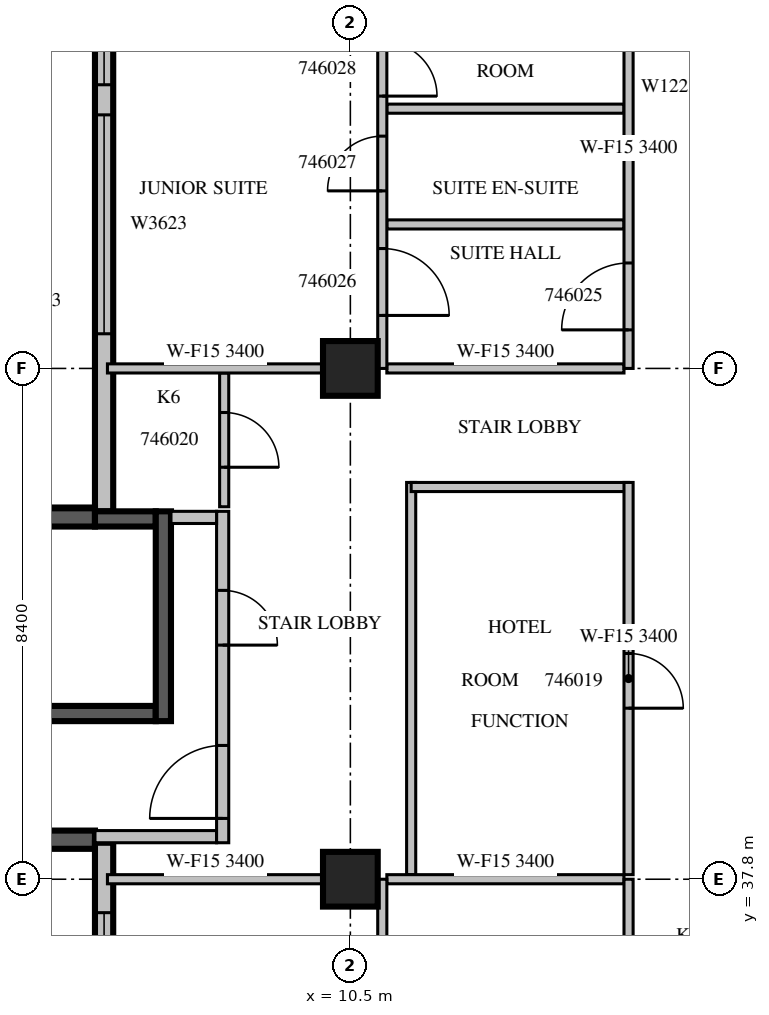
"""IFC4 building model, lengths in metres.
Left out: names, types, materials, properties, quantities, classifications, styles, units other than length and angle.
Written with IfcOpenShell. Run it as: python <this file> out.ifc"""

import sys

from ifc_helpers import new_model, si_unit, direction, frame, frame_2d, origin, origin_2d, place, context, subcontext, project, spatial, rectangle, extrude, source, transform, mapped, element, fill, save


model = new_model("IFC4")
c1 = context("Model", 3, precision=1e-05, world=origin(), true_north=direction((0.0, 1.0)))
c2 = subcontext(c1, "Body", "Model", "MODEL_VIEW")
j1 = project(units=[si_unit("LENGTHUNIT", "METRE"), si_unit("PLANEANGLEUNIT", "RADIAN")], contexts=[c1])
p1 = place(None, origin())
s1 = spatial("IfcSite", under=j1, at=p1, CompositionType="ELEMENT")
p2 = place(p1, origin())
s2 = spatial("IfcBuilding", under=s1, at=p2, CompositionType="ELEMENT")
p3 = place(p2, frame((0.0, 0.0, 208.2)))
s3 = spatial("IfcBuildingStorey", under=s2, at=p3, CompositionType="ELEMENT", Elevation=208.2)
m1 = source(origin(), c2, "Body", "SweptSolid", [
    extrude(rectangle(XDim=0.9, YDim=0.9, at=origin_2d()), origin(), (0.0, 0.0, 1.0), 3.8),
])
for number, where, z_axis, x_axis in (
    (1, (10.5, 37.8, 0.0), (0.0, 0.0, 1.0), (1.0, 0.0, 0.0)),
    (2, (10.5, 46.2, 0.0), (0.0, 0.0, 1.0), (1.0, 0.0, 0.0)),
):
    element("IfcColumn", number, at=place(p3, frame(where, z_axis=z_axis, x_axis=x_axis)), inside=s3, PredefinedType="COLUMN", context=c2, shape_type="MappedRepresentation", body=[
        mapped(m1, transform((0.0, 0.0, 0.0), scale=1.0)),
    ])
m2 = source(origin(), c2, "Body", "SweptSolid", [
    extrude(rectangle(XDim=9.91, YDim=0.3, at=frame_2d((4.955, 0.0))), origin(), (0.0, 0.0, 1.0), 3.4),
])
p4 = place(p3, frame((6.45, 53.76, 0.0), z_axis=(0.0, 0.0, 1.0), x_axis=(0.0, -1.0, 0.0)))
e3 = element("IfcWall", 3, at=p4, inside=s3, PredefinedType="STANDARD", context=c2, shape_type="MappedRepresentation", body=[
    mapped(m2, transform((0.0, 0.0, 0.0), scale=1.0)),
])
m3 = source(origin(), c2, "Body", "SweptSolid", [
    extrude(rectangle(XDim=3.6, YDim=2.3, at=frame_2d((1.8, 1.15))), frame((0.0, 0.16, 0.0), z_axis=(0.0, -1.0, 0.0), x_axis=(1.0, 0.0, 0.0)), (0.0, 0.0, 1.0), 0.32),
])
p5 = place(p4, frame((3.39, 0.0, 0.6)))
e4 = element("IfcOpeningElement", 4, at=p5, cuts=e3, PredefinedType="OPENING", context=c2, shape_type="MappedRepresentation", body=[
    mapped(m3, transform((0.0, 0.0, 0.0), scale=1.0)),
])
m4 = source(origin(), c2, "Body", "SweptSolid", [
    extrude(rectangle(XDim=2.4, YDim=2.3, at=frame_2d((1.2, 1.15))), frame((0.0, 0.16, 0.0), z_axis=(0.0, -1.0, 0.0), x_axis=(1.0, 0.0, 0.0)), (0.0, 0.0, 1.0), 0.32),
])
p6 = place(p4, frame((0.495, 0.0, 0.6)))
e5 = element("IfcOpeningElement", 5, at=p6, cuts=e3, PredefinedType="OPENING", context=c2, shape_type="MappedRepresentation", body=[
    mapped(m4, transform((0.0, 0.0, 0.0), scale=1.0)),
])
m5 = source(origin(), c2, "Body", "SweptSolid", [
    extrude(rectangle(XDim=6.1, YDim=0.3, at=frame_2d((3.05, 0.0))), origin(), (0.0, 0.0, 1.0), 3.4),
])
for number, where, z_axis, x_axis in (
    (6, (6.3, 43.75, 0.0), (0.0, 0.0, 1.0), (-1.0, 0.0, 0.0)),
    (7, (0.2, 38.45, 0.0), (0.0, 0.0, 1.0), (1.0, 0.0, 0.0)),
):
    element("IfcWall", number, at=place(p3, frame(where, z_axis=z_axis, x_axis=x_axis)), inside=s3, PredefinedType="SOLIDWALL", context=c2, shape_type="MappedRepresentation", body=[
        mapped(m5, transform((0.0, 0.0, 0.0), scale=1.0)),
    ])
m6 = source(origin(), c2, "Body", "SweptSolid", [
    extrude(rectangle(XDim=16.6, YDim=0.3, at=frame_2d((8.3, 0.0))), origin(), (0.0, 0.0, 1.0), 3.4),
])
p7 = place(p3, frame((6.45, 38.4, 0.0), z_axis=(0.0, 0.0, 1.0), x_axis=(0.0, -1.0, 0.0)))
e8 = element("IfcWall", 8, at=p7, inside=s3, PredefinedType="STANDARD", context=c2, shape_type="MappedRepresentation", body=[
    mapped(m6, transform((0.0, 0.0, 0.0), scale=1.0)),
])
m7 = source(origin(), c2, "Body", "SweptSolid", [
    extrude(rectangle(XDim=1.8, YDim=2.3, at=frame_2d((0.9, 1.15))), frame((0.0, 0.16, 0.0), z_axis=(0.0, -1.0, 0.0), x_axis=(1.0, 0.0, 0.0)), (0.0, 0.0, 1.0), 0.32),
])
p8 = place(p7, frame((1.15, 0.0, 0.6)))
e9 = element("IfcOpeningElement", 9, at=p8, cuts=e8, PredefinedType="OPENING", context=c2, shape_type="MappedRepresentation", body=[
    mapped(m7, transform((0.0, 0.0, 0.0), scale=1.0)),
])
p9 = place(p7, frame((9.438, 0.0, 0.6)))
e10 = element("IfcOpeningElement", 10, at=p9, cuts=e8, PredefinedType="OPENING", context=c2, shape_type="MappedRepresentation", body=[
    mapped(m7, transform((0.0, 0.0, 0.0), scale=1.0)),
])
m8 = source(origin(), c2, "Body", "SweptSolid", [
    extrude(rectangle(XDim=1.2, YDim=2.3, at=frame_2d((0.6, 1.15))), frame((0.0, 0.16, 0.0), z_axis=(0.0, -1.0, 0.0), x_axis=(1.0, 0.0, 0.0)), (0.0, 0.0, 1.0), 0.32),
])
p10 = place(p7, frame((14.338, 0.0, 0.6)))
e11 = element("IfcOpeningElement", 11, at=p10, cuts=e8, PredefinedType="OPENING", context=c2, shape_type="MappedRepresentation", body=[
    mapped(m8, transform((0.0, 0.0, 0.0), scale=1.0)),
])
p11 = place(p7, frame((11.887, 0.0, 0.6)))
e12 = element("IfcOpeningElement", 12, at=p11, cuts=e8, PredefinedType="OPENING", context=c2, shape_type="MappedRepresentation", body=[
    mapped(m7, transform((0.0, 0.0, 0.0), scale=1.0)),
])
m9 = source(origin(), c2, "Body", "SweptSolid", [
    extrude(rectangle(XDim=1.0, YDim=2.1, at=frame_2d((0.5, 1.05))), frame((0.0, 0.16, 0.0), z_axis=(0.0, -1.0, 0.0), x_axis=(1.0, 0.0, 0.0)), (0.0, 0.0, 1.0), 0.32),
])
p12 = place(p7, frame((5.45, 0.0, 0.0)))
e13 = element("IfcOpeningElement", 13, at=p12, cuts=e8, PredefinedType="OPENING", context=c2, shape_type="MappedRepresentation", body=[
    mapped(m9, transform((0.0, 0.0, 0.0), scale=1.0)),
])
m10 = source(origin(), c2, "Body", "SweptSolid", [
    extrude(rectangle(XDim=7.0, YDim=0.25, at=frame_2d((3.5, 0.0))), origin(), (0.0, 0.0, 1.0), 3.4),
])
p13 = place(p3, frame((0.3, 40.525, 0.0), z_axis=(0.0, 0.0, 1.0), x_axis=(1.0, 0.0, 0.0)))
e14 = element("IfcWall", 14, at=p13, inside=s3, PredefinedType="SOLIDWALL", context=c2, shape_type="MappedRepresentation", body=[
    mapped(m10, transform((0.0, 0.0, 0.0), scale=1.0)),
])
m11 = source(origin(), c2, "Body", "SweptSolid", [
    extrude(rectangle(XDim=1.1, YDim=2.1, at=frame_2d((0.55, 1.05))), frame((0.0, 0.135, 0.0), z_axis=(0.0, -1.0, 0.0), x_axis=(1.0, 0.0, 0.0)), (0.0, 0.0, 1.0), 0.27),
])
p14 = place(p13, frame((0.55, 0.0, 0.0)))
e15 = element("IfcOpeningElement", 15, at=p14, cuts=e14, PredefinedType="OPENING", context=c2, shape_type="MappedRepresentation", body=[
    mapped(m11, transform((0.0, 0.0, 0.0), scale=1.0)),
])
m12 = source(origin(), c2, "Body", "SweptSolid", [
    extrude(rectangle(XDim=1.0, YDim=0.25, at=frame_2d((0.5, 0.0))), origin(), (0.0, 0.0, 1.0), 3.4),
])
p15 = place(p3, frame((6.3, 43.725, 0.0), z_axis=(0.0, 0.0, 1.0), x_axis=(1.0, 0.0, 0.0)))
e16 = element("IfcWall", 16, at=p15, inside=s3, PredefinedType="SOLIDWALL", context=c2, shape_type="MappedRepresentation", body=[
    mapped(m12, transform((0.0, 0.0, 0.0), scale=1.0)),
])
m13 = source(origin(), c2, "Body", "SweptSolid", [
    extrude(rectangle(XDim=3.45, YDim=0.25, at=frame_2d((1.725, 0.0))), origin(), (0.0, 0.0, 1.0), 3.4),
])
p16 = place(p3, frame((7.425, 40.4, 0.0), z_axis=(0.0, 0.0, 1.0), x_axis=(0.0, 1.0, 0.0)))
e17 = element("IfcWall", 17, at=p16, inside=s3, PredefinedType="SOLIDWALL", context=c2, shape_type="MappedRepresentation", body=[
    mapped(m13, transform((0.0, 0.0, 0.0), scale=1.0)),
])
m14 = source(origin(), c2, "Body", "SweptSolid", [
    extrude(rectangle(XDim=2.0, YDim=0.2, at=frame_2d((1.0, 0.0))), origin(), (0.0, 0.0, 1.0), 3.4),
])
p17 = place(p3, frame((6.3, 38.5, 0.0), z_axis=(0.0, 0.0, 1.0), x_axis=(1.0, 0.0, 0.0)))
e18 = element("IfcWall", 18, at=p17, inside=s3, PredefinedType="PARTITIONING", context=c2, shape_type="MappedRepresentation", body=[
    mapped(m14, transform((0.0, 0.0, 0.0), scale=1.0)),
])
m15 = source(origin(), c2, "Body", "SweptSolid", [
    extrude(rectangle(XDim=5.45, YDim=0.2, at=frame_2d((2.725, 0.0))), origin(), (0.0, 0.0, 1.0), 3.4),
])
p18 = place(p3, frame((8.4, 38.4, 0.0), z_axis=(0.0, 0.0, 1.0), x_axis=(0.0, 1.0, 0.0)))
e19 = element("IfcWall", 19, at=p18, inside=s3, PredefinedType="PARTITIONING", context=c2, shape_type="MappedRepresentation", body=[
    mapped(m15, transform((0.0, 0.0, 0.0), scale=1.0)),
])
m16 = source(origin(), c2, "Body", "SweptSolid", [
    extrude(rectangle(XDim=1.2, YDim=2.1, at=frame_2d((0.6, 1.05))), frame((0.0, 0.11, 0.0), z_axis=(0.0, -1.0, 0.0), x_axis=(1.0, 0.0, 0.0)), (0.0, 0.0, 1.0), 0.22),
])
p19 = place(p18, frame((0.4, 0.0, 0.0)))
e20 = element("IfcOpeningElement", 20, at=p19, cuts=e19, PredefinedType="OPENING", context=c2, shape_type="MappedRepresentation", body=[
    mapped(m16, transform((0.0, 0.0, 0.0), scale=1.0)),
])
m17 = source(origin(), c2, "Body", "SweptSolid", [
    extrude(rectangle(XDim=0.9, YDim=2.1, at=frame_2d((0.45, 1.05))), frame((0.0, 0.11, 0.0), z_axis=(0.0, -1.0, 0.0), x_axis=(1.0, 0.0, 0.0)), (0.0, 0.0, 1.0), 0.22),
])
p20 = place(p18, frame((3.25, 0.0, 0.0)))
e21 = element("IfcOpeningElement", 21, at=p20, cuts=e19, PredefinedType="OPENING", context=c2, shape_type="MappedRepresentation", body=[
    mapped(m17, transform((0.0, 0.0, 0.0), scale=1.0)),
])
m18 = source(origin(), c2, "Body", "SweptSolid", [
    extrude(rectangle(XDim=0.75, YDim=0.2, at=frame_2d((0.375, 0.0))), origin(), (0.0, 0.0, 1.0), 3.4),
])
p21 = place(p3, frame((7.55, 43.75, 0.0), z_axis=(0.0, 0.0, 1.0), x_axis=(1.0, 0.0, 0.0)))
e22 = element("IfcWall", 22, at=p21, inside=s3, PredefinedType="PARTITIONING", context=c2, shape_type="MappedRepresentation", body=[
    mapped(m18, transform((0.0, 0.0, 0.0), scale=1.0)),
])
m19 = source(origin(), c2, "Body", "SweptSolid", [
    extrude(rectangle(XDim=6.45, YDim=0.15, at=frame_2d((3.225, 0.0))), origin(), (0.0, 0.0, 1.0), 3.4),
])
p22 = place(p3, frame((11.5, 44.325, 0.0), z_axis=(0.0, 0.0, 1.0), x_axis=(0.0, -1.0, 0.0)))
e23 = element("IfcWall", 23, at=p22, inside=s3, PredefinedType="PARTITIONING", context=c2, shape_type="MappedRepresentation", body=[
    mapped(m19, transform((0.0, 0.0, 0.0), scale=1.0)),
])
m20 = source(origin(), c2, "Body", "SweptSolid", [
    extrude(rectangle(XDim=3.575, YDim=0.15, at=frame_2d((1.788, 0.0))), origin(), (0.0, 0.0, 1.0), 3.4),
])
p23 = place(p3, frame((15.075, 44.25, 0.0), z_axis=(0.0, 0.0, 1.0), x_axis=(-1.0, 0.0, 0.0)))
e24 = element("IfcWall", 24, at=p23, inside=s3, PredefinedType="PARTITIONING", context=c2, shape_type="MappedRepresentation", body=[
    mapped(m20, transform((0.0, 0.0, 0.0), scale=1.0)),
])
p24 = place(p3, frame((15.075, 37.875, 0.0), z_axis=(0.0, 0.0, 1.0), x_axis=(0.0, 1.0, 0.0)))
e25 = element("IfcWall", 25, at=p24, inside=s3, PredefinedType="PARTITIONING", context=c2, shape_type="MappedRepresentation", body=[
    mapped(m19, transform((0.0, 0.0, 0.0), scale=1.0)),
])
m21 = source(origin(), c2, "Body", "SweptSolid", [
    extrude(rectangle(XDim=0.9, YDim=2.1, at=frame_2d((0.45, 1.05))), frame((0.0, 0.085, 0.0), z_axis=(0.0, -1.0, 0.0), x_axis=(1.0, 0.0, 0.0)), (0.0, 0.0, 1.0), 0.17),
])
p25 = place(p24, frame((2.737, 0.0, 0.0)))
e26 = element("IfcOpeningElement", 26, at=p25, cuts=e25, PredefinedType="OPENING", context=c2, shape_type="MappedRepresentation", body=[
    mapped(m21, transform((0.0, 0.0, 0.0), scale=1.0)),
])
m22 = source(origin(), c2, "Body", "SweptSolid", [
    extrude(rectangle(XDim=2.2, YDim=0.15, at=frame_2d((1.1, 0.0))), origin(), (0.0, 0.0, 1.0), 3.4),
])
p26 = place(p3, frame((8.425, 43.925, 0.0), z_axis=(0.0, 0.0, 1.0), x_axis=(0.0, 1.0, 0.0)))
e27 = element("IfcWall", 27, at=p26, inside=s3, PredefinedType="PARTITIONING", context=c2, shape_type="MappedRepresentation", body=[
    mapped(m22, transform((0.0, 0.0, 0.0), scale=1.0)),
])
p27 = place(p26, frame((0.65, 0.0, 0.0)))
e28 = element("IfcOpeningElement", 28, at=p27, cuts=e27, PredefinedType="OPENING", context=c2, shape_type="MappedRepresentation", body=[
    mapped(m21, transform((0.0, 0.0, 0.0), scale=1.0)),
])
m23 = source(origin(), c2, "Body", "SweptSolid", [
    extrude(rectangle(XDim=3.546, YDim=0.15, at=frame_2d((1.773, 0.0))), origin(), (0.0, 0.0, 1.0), 3.4),
])
p28 = place(p3, frame((10.051, 37.8, 0.0), z_axis=(0.0, 0.0, 1.0), x_axis=(-1.0, 0.0, 0.0)))
e29 = element("IfcWall", 29, at=p28, inside=s3, PredefinedType="PARTITIONING", context=c2, shape_type="MappedRepresentation", body=[
    mapped(m23, transform((0.0, 0.0, 0.0), scale=1.0)),
])
m24 = source(origin(), c2, "Body", "SweptSolid", [
    extrude(rectangle(XDim=3.9, YDim=0.15, at=frame_2d((1.95, 0.0))), origin(), (0.0, 0.0, 1.0), 3.4),
])
p29 = place(p3, frame((15.0, 37.8, 0.0), z_axis=(0.0, 0.0, 1.0), x_axis=(-1.0, 0.0, 0.0)))
e30 = element("IfcWall", 30, at=p29, inside=s3, PredefinedType="PARTITIONING", context=c2, shape_type="MappedRepresentation", body=[
    mapped(m24, transform((0.0, 0.0, 0.0), scale=1.0)),
])
m25 = source(origin(), c2, "Body", "SweptSolid", [
    extrude(rectangle(XDim=8.4, YDim=0.15, at=frame_2d((4.2, 0.0))), origin(), (0.0, 0.0, 1.0), 3.4),
])
p30 = place(p3, frame((11.025, 29.4, 0.0), z_axis=(0.0, 0.0, 1.0), x_axis=(0.0, 1.0, 0.0)))
e31 = element("IfcWall", 31, at=p30, inside=s3, PredefinedType="PARTITIONING", context=c2, shape_type="MappedRepresentation", body=[
    mapped(m25, transform((0.0, 0.0, 0.0), scale=1.0)),
])
m26 = source(origin(), c2, "Body", "SweptSolid", [
    extrude(rectangle(XDim=1.1, YDim=2.1, at=frame_2d((0.55, 1.05))), frame((0.0, 0.085, 0.0), z_axis=(0.0, -1.0, 0.0), x_axis=(1.0, 0.0, 0.0)), (0.0, 0.0, 1.0), 0.17),
])
p31 = place(p30, frame((0.876, 0.0, 0.0)))
e32 = element("IfcOpeningElement", 32, at=p31, cuts=e31, PredefinedType="OPENING", context=c2, shape_type="MappedRepresentation", body=[
    mapped(m26, transform((0.0, 0.0, 0.0), scale=1.0)),
])
p32 = place(p30, frame((3.38, 0.0, 0.0)))
e33 = element("IfcOpeningElement", 33, at=p32, cuts=e31, PredefinedType="OPENING", context=c2, shape_type="MappedRepresentation", body=[
    mapped(m21, transform((0.0, 0.0, 0.0), scale=1.0)),
])
p33 = place(p30, frame((6.154, 0.0, 0.0)))
e34 = element("IfcOpeningElement", 34, at=p33, cuts=e31, PredefinedType="OPENING", context=c2, shape_type="MappedRepresentation", body=[
    mapped(m21, transform((0.0, 0.0, 0.0), scale=1.0)),
])
for number, where, z_axis, x_axis in (
    (35, (15.0, 48.568, 0.0), (0.0, 0.0, 1.0), (-1.0, 0.0, 0.0)),
    (36, (15.0, 50.472, 0.0), (0.0, 0.0, 1.0), (-1.0, 0.0, 0.0)),
):
    element("IfcWall", number, at=place(p3, frame(where, z_axis=z_axis, x_axis=x_axis)), inside=s3, PredefinedType="PARTITIONING", context=c2, shape_type="MappedRepresentation", body=[
        mapped(m24, transform((0.0, 0.0, 0.0), scale=1.0)),
    ])
p34 = place(p3, frame((10.051, 46.2, 0.0), z_axis=(0.0, 0.0, 1.0), x_axis=(-1.0, 0.0, 0.0)))
e37 = element("IfcWall", 37, at=p34, inside=s3, PredefinedType="PARTITIONING", context=c2, shape_type="MappedRepresentation", body=[
    mapped(m23, transform((0.0, 0.0, 0.0), scale=1.0)),
])
p35 = place(p3, frame((15.0, 46.2, 0.0), z_axis=(0.0, 0.0, 1.0), x_axis=(-1.0, 0.0, 0.0)))
e38 = element("IfcWall", 38, at=p35, inside=s3, PredefinedType="PARTITIONING", context=c2, shape_type="MappedRepresentation", body=[
    mapped(m24, transform((0.0, 0.0, 0.0), scale=1.0)),
])
m27 = source(origin(), c2, "Body", "SweptSolid", [
    extrude(rectangle(XDim=7.26, YDim=0.15, at=frame_2d((3.63, 0.0))), origin(), (0.0, 0.0, 1.0), 3.4),
])
p36 = place(p3, frame((11.025, 46.2, 0.0), z_axis=(0.0, 0.0, 1.0), x_axis=(0.0, 1.0, 0.0)))
e39 = element("IfcWall", 39, at=p36, inside=s3, PredefinedType="PARTITIONING", context=c2, shape_type="MappedRepresentation", body=[
    mapped(m27, transform((0.0, 0.0, 0.0), scale=1.0)),
])
p37 = place(p36, frame((0.872, 0.0, 0.0)))
e40 = element("IfcOpeningElement", 40, at=p37, cuts=e39, PredefinedType="OPENING", context=c2, shape_type="MappedRepresentation", body=[
    mapped(m26, transform((0.0, 0.0, 0.0), scale=1.0)),
])
p38 = place(p36, frame((2.92, 0.0, 0.0)))
e41 = element("IfcOpeningElement", 41, at=p38, cuts=e39, PredefinedType="OPENING", context=c2, shape_type="MappedRepresentation", body=[
    mapped(m21, transform((0.0, 0.0, 0.0), scale=1.0)),
])
p39 = place(p36, frame((4.478, 0.0, 0.0)))
e42 = element("IfcOpeningElement", 42, at=p39, cuts=e39, PredefinedType="OPENING", context=c2, shape_type="MappedRepresentation", body=[
    mapped(m21, transform((0.0, 0.0, 0.0), scale=1.0)),
])
p40 = place(p3, frame((15.075, 29.4, 0.0), z_axis=(0.0, 0.0, 1.0), x_axis=(0.0, 1.0, 0.0)))
e43 = element("IfcWall", 43, at=p40, inside=s3, PredefinedType="PARTITIONING", context=c2, shape_type="MappedRepresentation", body=[
    mapped(m25, transform((0.0, 0.0, 0.0), scale=1.0)),
])
p41 = place(p40, frame((0.638, 0.0, 0.0)))
e44 = element("IfcOpeningElement", 44, at=p41, cuts=e43, PredefinedType="OPENING", context=c2, shape_type="MappedRepresentation", body=[
    mapped(m26, transform((0.0, 0.0, 0.0), scale=1.0)),
])
p42 = place(p3, frame((15.075, 46.2, 0.0), z_axis=(0.0, 0.0, 1.0), x_axis=(0.0, 1.0, 0.0)))
e45 = element("IfcWall", 45, at=p42, inside=s3, PredefinedType="PARTITIONING", context=c2, shape_type="MappedRepresentation", body=[
    mapped(m27, transform((0.0, 0.0, 0.0), scale=1.0)),
])
p43 = place(p42, frame((0.634, 0.0, 0.0)))
e46 = element("IfcOpeningElement", 46, at=p43, cuts=e45, PredefinedType="OPENING", context=c2, shape_type="MappedRepresentation", body=[
    mapped(m26, transform((0.0, 0.0, 0.0), scale=1.0)),
])
m28 = source(origin(), c2, "Body", "SweptSolid", [
    extrude(rectangle(XDim=3.6, YDim=2.3, at=frame_2d((1.8, 1.15))), frame((0.0, 0.03, 0.0), z_axis=(0.0, -1.0, 0.0), x_axis=(1.0, 0.0, 0.0)), (0.0, 0.0, 1.0), 0.06),
])
p44 = place(p5, origin())
e47 = element("IfcWindow", 47, at=p44, inside=s3, PartitioningType="SINGLE_PANEL", PredefinedType="WINDOW", context=c2, shape_type="MappedRepresentation", body=[
    mapped(m28, transform((0.0, 0.0, 0.0), scale=1.0)),
])
fill(e4, e47)
m29 = source(origin(), c2, "Body", "SweptSolid", [
    extrude(rectangle(XDim=2.4, YDim=2.3, at=frame_2d((1.2, 1.15))), frame((0.0, 0.03, 0.0), z_axis=(0.0, -1.0, 0.0), x_axis=(1.0, 0.0, 0.0)), (0.0, 0.0, 1.0), 0.06),
])
p45 = place(p6, origin())
e48 = element("IfcWindow", 48, at=p45, inside=s3, PartitioningType="SINGLE_PANEL", PredefinedType="WINDOW", context=c2, shape_type="MappedRepresentation", body=[
    mapped(m29, transform((0.0, 0.0, 0.0), scale=1.0)),
])
fill(e5, e48)
m30 = source(origin(), c2, "Body", "SweptSolid", [
    extrude(rectangle(XDim=1.8, YDim=2.3, at=frame_2d((0.9, 1.15))), frame((0.0, 0.03, 0.0), z_axis=(0.0, -1.0, 0.0), x_axis=(1.0, 0.0, 0.0)), (0.0, 0.0, 1.0), 0.06),
])
p46 = place(p8, origin())
e49 = element("IfcWindow", 49, at=p46, inside=s3, PartitioningType="SINGLE_PANEL", PredefinedType="WINDOW", context=c2, shape_type="MappedRepresentation", body=[
    mapped(m30, transform((0.0, 0.0, 0.0), scale=1.0)),
])
fill(e9, e49)
m31 = source(origin(), c2, "Body", "SweptSolid", [
    extrude(rectangle(XDim=1.2, YDim=2.1, at=frame_2d((0.6, 1.05))), frame((0.0, 0.025, 0.0), z_axis=(0.0, -1.0, 0.0), x_axis=(1.0, 0.0, 0.0)), (0.0, 0.0, 1.0), 0.05),
])
p47 = place(p19, origin())
e50 = element("IfcDoor", 50, at=p47, inside=s3, OperationType="SINGLE_SWING_LEFT", PredefinedType="DOOR", context=c2, shape_type="MappedRepresentation", body=[
    mapped(m31, transform((0.0, 0.0, 0.0), scale=1.0)),
])
fill(e20, e50)
m32 = source(origin(), c2, "Body", "SweptSolid", [
    extrude(rectangle(XDim=0.9, YDim=2.1, at=frame_2d((0.45, 1.05))), frame((0.0, 0.025, 0.0), z_axis=(0.0, -1.0, 0.0), x_axis=(1.0, 0.0, 0.0)), (0.0, 0.0, 1.0), 0.05),
])
p48 = place(p20, origin())
e51 = element("IfcDoor", 51, at=p48, inside=s3, OperationType="SINGLE_SWING_RIGHT", PredefinedType="DOOR", context=c2, shape_type="MappedRepresentation", body=[
    mapped(m32, transform((0.0, 0.0, 0.0), scale=1.0)),
])
fill(e21, e51)
p49 = place(p25, origin())
e52 = element("IfcDoor", 52, at=p49, inside=s3, OperationType="SINGLE_SWING_RIGHT", PredefinedType="DOOR", context=c2, shape_type="MappedRepresentation", body=[
    mapped(m32, transform((0.0, 0.0, 0.0), scale=1.0)),
])
fill(e26, e52)
p50 = place(p27, origin())
e53 = element("IfcDoor", 53, at=p50, inside=s3, OperationType="SINGLE_SWING_RIGHT", PredefinedType="DOOR", context=c2, shape_type="MappedRepresentation", body=[
    mapped(m32, transform((0.0, 0.0, 0.0), scale=1.0)),
])
fill(e28, e53)
m33 = source(origin(), c2, "Body", "SweptSolid", [
    extrude(rectangle(XDim=1.1, YDim=2.1, at=frame_2d((0.55, 1.05))), frame((0.0, 0.025, 0.0), z_axis=(0.0, -1.0, 0.0), x_axis=(1.0, 0.0, 0.0)), (0.0, 0.0, 1.0), 0.05),
])
p51 = place(p43, origin())
e54 = element("IfcDoor", 54, at=p51, inside=s3, OperationType="SINGLE_SWING_LEFT", PredefinedType="DOOR", context=c2, shape_type="MappedRepresentation", body=[
    mapped(m33, transform((0.0, 0.0, 0.0), scale=1.0)),
])
fill(e46, e54)
p52 = place(p37, origin())
e55 = element("IfcDoor", 55, at=p52, inside=s3, OperationType="SINGLE_SWING_RIGHT", PredefinedType="DOOR", context=c2, shape_type="MappedRepresentation", body=[
    mapped(m33, transform((0.0, 0.0, 0.0), scale=1.0)),
])
fill(e40, e55)
p53 = place(p38, origin())
e56 = element("IfcDoor", 56, at=p53, inside=s3, OperationType="SINGLE_SWING_LEFT", PredefinedType="DOOR", context=c2, shape_type="MappedRepresentation", body=[
    mapped(m32, transform((0.0, 0.0, 0.0), scale=1.0)),
])
fill(e41, e56)
p54 = place(p39, origin())
e57 = element("IfcDoor", 57, at=p54, inside=s3, OperationType="SINGLE_SWING_RIGHT", PredefinedType="DOOR", context=c2, shape_type="MappedRepresentation", body=[
    mapped(m32, transform((0.0, 0.0, 0.0), scale=1.0)),
])
fill(e42, e57)
save(model, sys.argv[1])
